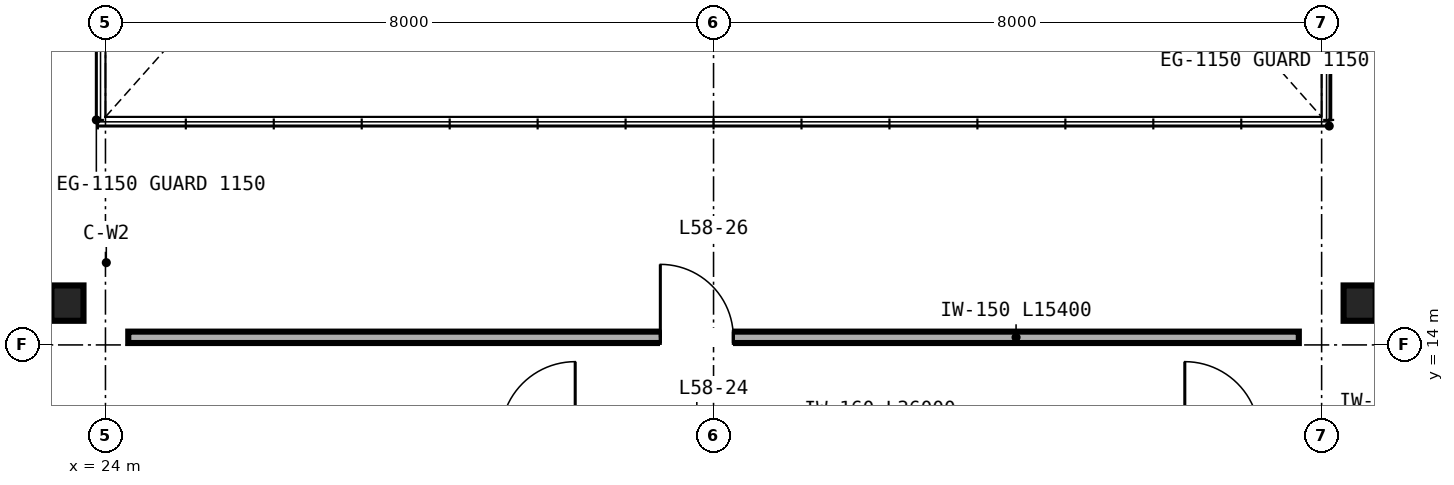
"""IFC4 building model, lengths in metres.
Left out: names, types, materials, properties, quantities, classifications, styles, units other than length and angle.
Written with IfcOpenShell. Run it as: python <this file> out.ifc"""

import sys

from ifc_helpers import new_model, si_unit, direction, frame, frame_2d, origin, origin_2d, place, context, subcontext, project, spatial, rectangle, i_section, extrude, source, transform, mapped, element, fill, save


model = new_model("IFC4")
c1 = context("Model", 3, precision=1e-05, world=origin(), true_north=direction((0.0, 1.0)))
c2 = subcontext(c1, "Body", "Model", "MODEL_VIEW")
j1 = project(units=[si_unit("LENGTHUNIT", "METRE"), si_unit("PLANEANGLEUNIT", "RADIAN")], contexts=[c1])
p1 = place(None, origin())
s1 = spatial("IfcSite", under=j1, at=p1, CompositionType="ELEMENT")
p2 = place(p1, origin())
s2 = spatial("IfcBuilding", under=s1, at=p2, CompositionType="ELEMENT")
p3 = place(p2, frame((0.0, 0.0, 232.8)))
s3 = spatial("IfcBuildingStorey", under=s2, at=p3, CompositionType="ELEMENT", Elevation=232.8)
m1 = source(origin(), c2, "Body", "SweptSolid", [
    extrude(i_section(OverallWidth=0.422, OverallDepth=0.465, WebThickness=0.045, FlangeThickness=0.073, FilletRadius=0.025, at=origin_2d()), origin(), (0.0, 0.0, 1.0), 3.38),
])
for number, where, z_axis, x_axis in (
    (1, (23.5, 14.55, 0.0), (0.0, 0.0, 1.0), (1.0, 0.0, 0.0)),
    (2, (40.5, 14.55, 0.0), (0.0, 0.0, 1.0), (1.0, 0.0, 0.0)),
):
    element("IfcColumn", number, at=place(p3, frame(where, z_axis=z_axis, x_axis=x_axis)), inside=s3, PredefinedType="COLUMN", context=c2, shape_type="MappedRepresentation", body=[
        mapped(m1, transform((0.0, 0.0, 0.0), scale=1.0)),
    ])
p4 = place(p3, frame((24.3, 14.1, 0.0), z_axis=(0.0, 0.0, 1.0), x_axis=(1.0, 0.0, 0.0)))
e3 = element("IfcWall", 3, at=p4, inside=s3, PredefinedType="PARTITIONING", context=c2, shape_type="SweptSolid", body=[
    extrude(rectangle(XDim=15.4, YDim=0.15, at=frame_2d((7.7, 0.0))), origin(), (0.0, 0.0, 1.0), 3.38),
])
p5 = place(p4, frame((7.0, 0.0, 0.0)))
e4 = element("IfcOpeningElement", 4, at=p5, cuts=e3, PredefinedType="OPENING", context=c2, shape_type="SweptSolid", body=[
    extrude(rectangle(XDim=0.96, YDim=2.15, at=frame_2d((0.48, 1.075))), frame((0.0, 0.085, 0.0), z_axis=(0.0, -1.0, 0.0), x_axis=(1.0, 0.0, 0.0)), (0.0, 0.0, 1.0), 0.17),
])
m2 = source(origin(), c2, "Body", "SweptSolid", [
    extrude(rectangle(XDim=0.96, YDim=2.15, at=frame_2d((0.48, 1.075))), frame((0.0, 0.025, 0.0), z_axis=(0.0, -1.0, 0.0), x_axis=(1.0, 0.0, 0.0)), (0.0, 0.0, 1.0), 0.05),
])
p6 = place(p5, origin())
e5 = element("IfcDoor", 5, at=p6, inside=s3, OperationType="SINGLE_SWING_LEFT", PredefinedType="DOOR", context=c2, shape_type="MappedRepresentation", body=[
    mapped(m2, transform((0.0, 0.0, 0.0), scale=1.0)),
])
fill(e4, e5)
save(model, sys.argv[1])
